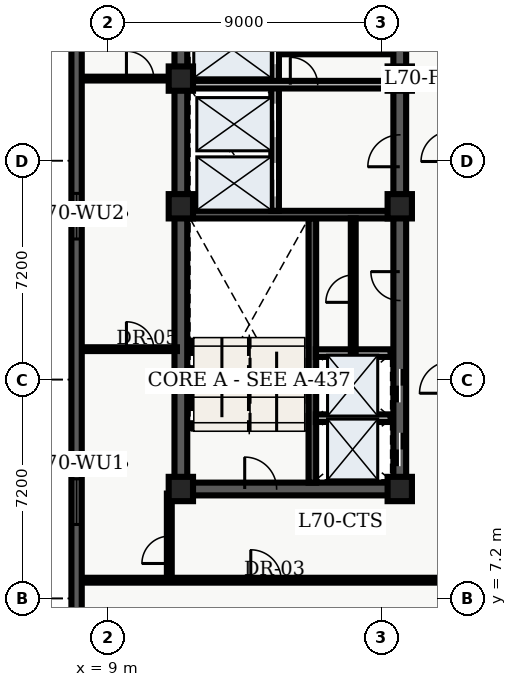
"""IFC4 building model, lengths in metres.
Left out: names, types, materials, properties, quantities, classifications, styles, units other than length and angle.
Written with IfcOpenShell. Run it as: python <this file> out.ifc"""

import sys

from ifc_helpers import new_model, entity, si_unit, converted_unit, direction, frame, origin_with_axes, origin_2d_with_axis, place, context, subcontext, project, spatial, polyline, rectangle, outline, extrude, element, fill, save


model = new_model("IFC4")
c1 = context("Model", 3, precision=1e-05, world=origin_with_axes(), true_north=direction((0.0, 1.0)))
c2 = subcontext(c1, "Body", "Model", "MODEL_VIEW")
j1 = project(units=[si_unit("LENGTHUNIT", "METRE"), converted_unit("PLANEANGLEUNIT", "DEGREE", entity("IfcPlaneAngleMeasure", 0.017), si_unit("PLANEANGLEUNIT", "RADIAN"), dimensions=[0, 0, 0, 0, 0, 0, 0])], contexts=[c1])
p1 = place(None, origin_with_axes())
s1 = spatial("IfcSite", under=j1, at=p1, CompositionType="ELEMENT")
p2 = place(p1, origin_with_axes())
s2 = spatial("IfcBuilding", under=s1, at=p2, CompositionType="ELEMENT")
p3 = place(p2, frame((0.0, 0.0, 284.1), z_axis=(0.0, 0.0, 1.0), x_axis=(1.0, 0.0, 0.0)))
s3 = spatial("IfcBuildingStorey", under=s2, at=p3, CompositionType="ELEMENT", Elevation=284.1)
p4 = place(p3, frame((11.4, 10.8, 0.0), z_axis=(0.0, 0.0, 1.0), x_axis=(0.0, 1.0, 0.0)))
e1 = element("IfcWall", 1, at=p4, inside=s3, PredefinedType="SHEAR", context=c2, shape_type="SweptSolid", body=[
    extrude(outline(polyline([(0.0, -0.21), (27.0, -0.21), (27.0, 0.21), (0.0, 0.21), (0.0, -0.21)])), origin_with_axes(), (0.0, 0.0, 1.0), 3.6),
])
p5 = place(p3, frame((11.4, 10.8, 0.0), z_axis=(0.0, 0.0, 1.0), x_axis=(1.0, 0.0, 0.0)))
e2 = element("IfcWall", 2, at=p5, inside=s3, PredefinedType="SHEAR", context=c2, shape_type="SweptSolid", body=[
    extrude(outline(polyline([(0.0, -0.21), (7.2, -0.21), (7.2, 0.21), (0.0, 0.21), (0.0, -0.21)])), origin_with_axes(), (0.0, 0.0, 1.0), 3.6),
])
p6 = place(p5, frame((2.625, 0.0, 0.0), z_axis=(0.0, 0.0, 1.0), x_axis=(1.0, 0.0, 0.0)))
e3 = element("IfcOpeningElement", 3, at=p6, cuts=e2, PredefinedType="OPENING", context=c2, shape_type="SweptSolid", body=[
    extrude(rectangle(XDim=1.05, YDim=0.44, at=origin_2d_with_axis()), origin_with_axes(), (0.0, 0.0, 1.0), 2.15),
])
p7 = place(p3, frame((18.6, 10.8, 0.0), z_axis=(0.0, 0.0, 1.0), x_axis=(0.0, 1.0, 0.0)))
e4 = element("IfcWall", 4, at=p7, inside=s3, PredefinedType="SHEAR", context=c2, shape_type="SweptSolid", body=[
    extrude(outline(polyline([(0.0, -0.21), (13.5, -0.21), (13.5, 0.21), (0.0, 0.21), (0.0, -0.21)])), origin_with_axes(), (0.0, 0.0, 1.0), 3.6),
])
p8 = place(p7, frame((1.3, 0.0, 0.0), z_axis=(0.0, 0.0, 1.0), x_axis=(1.0, 0.0, 0.0)))
e5 = element("IfcOpeningElement", 5, at=p8, cuts=e4, PredefinedType="OPENING", context=c2, shape_type="SweptSolid", body=[
    extrude(rectangle(XDim=1.1, YDim=0.44, at=origin_2d_with_axis()), origin_with_axes(), (0.0, 0.0, 1.0), 2.15),
])
p9 = place(p7, frame((3.4, 0.0, 0.0), z_axis=(0.0, 0.0, 1.0), x_axis=(1.0, 0.0, 0.0)))
e6 = element("IfcOpeningElement", 6, at=p9, cuts=e4, PredefinedType="OPENING", context=c2, shape_type="SweptSolid", body=[
    extrude(rectangle(XDim=1.1, YDim=0.44, at=origin_2d_with_axis()), origin_with_axes(), (0.0, 0.0, 1.0), 2.15),
])
p10 = place(p7, frame((11.125, 0.0, 0.0), z_axis=(0.0, 0.0, 1.0), x_axis=(1.0, 0.0, 0.0)))
e7 = element("IfcOpeningElement", 7, at=p10, cuts=e4, PredefinedType="OPENING", context=c2, shape_type="SweptSolid", body=[
    extrude(rectangle(XDim=1.05, YDim=0.44, at=origin_2d_with_axis()), origin_with_axes(), (0.0, 0.0, 1.0), 2.15),
])
p11 = place(p7, frame((6.675, 0.0, 0.0), z_axis=(0.0, 0.0, 1.0), x_axis=(1.0, 0.0, 0.0)))
e8 = element("IfcOpeningElement", 8, at=p11, cuts=e4, PredefinedType="OPENING", context=c2, shape_type="SweptSolid", body=[
    extrude(rectangle(XDim=0.95, YDim=0.44, at=origin_2d_with_axis()), origin_with_axes(), (0.0, 0.0, 1.0), 2.15),
])
p12 = place(p3, frame((18.6, 24.3, 0.0), z_axis=(0.0, 0.0, 1.0), x_axis=(0.0, 1.0, 0.0)))
e9 = element("IfcWall", 9, at=p12, inside=s3, PredefinedType="SHEAR", context=c2, shape_type="SweptSolid", body=[
    extrude(outline(polyline([(0.0, -0.21), (13.5, -0.21), (13.5, 0.21), (0.0, 0.21), (0.0, -0.21)])), origin_with_axes(), (0.0, 0.0, 1.0), 3.6),
])
p13 = place(p12, frame((6.725, 0.0, 0.0), z_axis=(0.0, 0.0, 1.0), x_axis=(1.0, 0.0, 0.0)))
e10 = element("IfcOpeningElement", 10, at=p13, cuts=e9, PredefinedType="OPENING", context=c2, shape_type="SweptSolid", body=[
    extrude(rectangle(XDim=1.05, YDim=0.44, at=origin_2d_with_axis()), origin_with_axes(), (0.0, 0.0, 1.0), 2.15),
])
p14 = place(p12, frame((11.125, 0.0, 0.0), z_axis=(0.0, 0.0, 1.0), x_axis=(1.0, 0.0, 0.0)))
e11 = element("IfcOpeningElement", 11, at=p14, cuts=e9, PredefinedType="OPENING", context=c2, shape_type="SweptSolid", body=[
    extrude(rectangle(XDim=1.05, YDim=0.44, at=origin_2d_with_axis()), origin_with_axes(), (0.0, 0.0, 1.0), 2.15),
])
p15 = place(p3, frame((15.725, 11.01, 0.0), z_axis=(0.0, 0.0, 1.0), x_axis=(0.0, 1.0, 0.0)))
e12 = element("IfcWall", 12, at=p15, inside=s3, PredefinedType="SHEAR", context=c2, shape_type="SweptSolid", body=[
    extrude(outline(polyline([(0.0, -0.125), (8.69, -0.125), (8.69, 0.125), (0.0, 0.125), (0.0, -0.125)])), origin_with_axes(), (0.0, 0.0, 1.0), 3.6),
])
p16 = place(p3, frame((11.61, 19.825, 0.0), z_axis=(0.0, 0.0, 1.0), x_axis=(1.0, 0.0, 0.0)))
e13 = element("IfcWall", 13, at=p16, inside=s3, PredefinedType="SHEAR", context=c2, shape_type="SweptSolid", body=[
    extrude(outline(polyline([(0.0, -0.125), (6.78, -0.125), (6.78, 0.125), (0.0, 0.125), (0.0, -0.125)])), origin_with_axes(), (0.0, 0.0, 1.0), 3.6),
])
p17 = place(p3, frame((14.5, 19.95, 0.0), z_axis=(0.0, 0.0, 1.0), x_axis=(0.0, 1.0, 0.0)))
e14 = element("IfcWall", 14, at=p17, inside=s3, PredefinedType="SOLIDWALL", context=c2, shape_type="SweptSolid", body=[
    extrude(outline(polyline([(0.0, -0.125), (6.25, -0.125), (6.25, 0.125), (0.0, 0.125), (0.0, -0.125)])), origin_with_axes(), (0.0, 0.0, 1.0), 2.64),
])
p18 = place(p17, frame((1.025, 0.0, 0.0), z_axis=(0.0, 0.0, 1.0), x_axis=(1.0, 0.0, 0.0)))
e15 = element("IfcOpeningElement", 15, at=p18, cuts=e14, PredefinedType="OPENING", context=c2, shape_type="SweptSolid", body=[
    extrude(rectangle(XDim=1.1, YDim=0.27, at=origin_2d_with_axis()), origin_with_axes(), (0.0, 0.0, 1.0), 2.15),
])
p19 = place(p17, frame((2.975, 0.0, 0.0), z_axis=(0.0, 0.0, 1.0), x_axis=(1.0, 0.0, 0.0)))
e16 = element("IfcOpeningElement", 16, at=p19, cuts=e14, PredefinedType="OPENING", context=c2, shape_type="SweptSolid", body=[
    extrude(rectangle(XDim=1.1, YDim=0.27, at=origin_2d_with_axis()), origin_with_axes(), (0.0, 0.0, 1.0), 2.15),
])
p20 = place(p17, frame((5.425, 0.0, 0.0), z_axis=(0.0, 0.0, 1.0), x_axis=(1.0, 0.0, 0.0)))
e17 = element("IfcOpeningElement", 17, at=p20, cuts=e14, PredefinedType="OPENING", context=c2, shape_type="SweptSolid", body=[
    extrude(rectangle(XDim=1.2, YDim=0.27, at=origin_2d_with_axis()), origin_with_axes(), (0.0, 0.0, 1.0), 2.15),
])
p21 = place(p3, frame((11.7, 24.1, 0.0), z_axis=(0.0, 0.0, 1.0), x_axis=(1.0, 0.0, 0.0)))
e18 = element("IfcWall", 18, at=p21, inside=s3, PredefinedType="SOLIDWALL", context=c2, shape_type="SweptSolid", body=[
    extrude(outline(polyline([(0.0, -0.125), (6.6, -0.125), (6.6, 0.125), (0.0, 0.125), (0.0, -0.125)])), origin_with_axes(), (0.0, 0.0, 1.0), 2.64),
])
p22 = place(p21, frame((3.75, 0.0, 0.0), z_axis=(0.0, 0.0, 1.0), x_axis=(1.0, 0.0, 0.0)))
e19 = element("IfcOpeningElement", 19, at=p22, cuts=e18, PredefinedType="OPENING", context=c2, shape_type="SweptSolid", body=[
    extrude(rectangle(XDim=0.9, YDim=0.27, at=origin_2d_with_axis()), origin_with_axes(), (0.0, 0.0, 1.0), 2.15),
])
for number, where, z_axis, x_axis in (
    (20, (11.4, 10.8, 0.0), (0.0, 0.0, 1.0), (1.0, 0.0, 0.0)),
    (21, (11.4, 20.1, 0.0), (0.0, 0.0, 1.0), (1.0, 0.0, 0.0)),
    (22, (11.4, 24.3, 0.0), (0.0, 0.0, 1.0), (1.0, 0.0, 0.0)),
    (23, (18.6, 10.8, 0.0), (0.0, 0.0, 1.0), (1.0, 0.0, 0.0)),
    (24, (18.6, 20.1, 0.0), (0.0, 0.0, 1.0), (1.0, 0.0, 0.0)),
    (25, (18.6, 24.3, 0.0), (0.0, 0.0, 1.0), (1.0, 0.0, 0.0)),
):
    element("IfcColumn", number, at=place(p3, frame(where, z_axis=z_axis, x_axis=x_axis)), inside=s3, PredefinedType="COLUMN", context=c2, shape_type="SweptSolid", body=[
        extrude(rectangle(XDim=0.8, YDim=0.8, at=origin_2d_with_axis()), origin_with_axes(), (0.0, 0.0, 1.0), 3.9),
    ])
p23 = place(p3, frame((14.62, 25.18, 0.0), z_axis=(0.0, 0.0, 1.0), x_axis=(1.0, 0.0, 0.0)))
e26 = element("IfcWall", 26, at=p23, inside=s3, PredefinedType="PARTITIONING", context=c2, shape_type="SweptSolid", body=[
    extrude(outline(polyline([(0.0, -0.08), (3.68, -0.08), (3.68, 0.08), (0.0, 0.08), (0.0, -0.08)])), origin_with_axes(), (0.0, 0.0, 1.0), 2.64),
])
p24 = place(p23, frame((1.95, 0.0, 0.0), z_axis=(0.0, 0.0, 1.0), x_axis=(1.0, 0.0, 0.0)))
e27 = element("IfcOpeningElement", 27, at=p24, cuts=e26, PredefinedType="OPENING", context=c2, shape_type="SweptSolid", body=[
    extrude(rectangle(XDim=0.9, YDim=0.18, at=origin_2d_with_axis()), origin_with_axes(), (0.0, 0.0, 1.0), 2.15),
])
for number, where, z_axis, x_axis in (
    (28, (15.84, 13.13, 0.0), (0.0, 0.0, 1.0), (1.0, 0.0, 0.0)),
    (29, (15.84, 15.27, 0.0), (0.0, 0.0, 1.0), (1.0, 0.0, 0.0)),
):
    element("IfcWall", number, at=place(p3, frame(where, z_axis=z_axis, x_axis=x_axis)), inside=s3, PredefinedType="SOLIDWALL", context=c2, shape_type="SweptSolid", body=[
        extrude(outline(polyline([(0.0, -0.125), (2.46, -0.125), (2.46, 0.125), (0.0, 0.125), (0.0, -0.125)])), origin_with_axes(), (0.0, 0.0, 1.0), 2.64),
    ])
p25 = place(p3, frame((17.07, 15.34, 0.0), z_axis=(0.0, 0.0, 1.0), x_axis=(0.0, 1.0, 0.0)))
e30 = element("IfcWall", 30, at=p25, inside=s3, PredefinedType="PARTITIONING", context=c2, shape_type="SweptSolid", body=[
    extrude(outline(polyline([(0.0, -0.08), (4.36, -0.08), (4.36, 0.08), (0.0, 0.08), (0.0, -0.08)])), origin_with_axes(), (0.0, 0.0, 1.0), 2.64),
])
p26 = place(p25, frame((2.05, 0.0, 0.0), z_axis=(0.0, 0.0, 1.0), x_axis=(1.0, 0.0, 0.0)))
e31 = element("IfcOpeningElement", 31, at=p26, cuts=e30, PredefinedType="OPENING", context=c2, shape_type="SweptSolid", body=[
    extrude(rectangle(XDim=0.9, YDim=0.18, at=origin_2d_with_axis()), origin_with_axes(), (0.0, 0.0, 1.0), 2.15),
])
p27 = place(p3, frame((8.135, 7.8, 0.0), z_axis=(0.0, 0.0, 1.0), x_axis=(1.0, 0.0, 0.0)))
e32 = element("IfcWall", 32, at=p27, inside=s3, PredefinedType="PARTITIONING", context=c2, shape_type="SweptSolid", body=[
    extrude(outline(polyline([(0.0, -0.08), (12.165, -0.08), (12.165, 0.08), (0.0, 0.08), (0.0, -0.08)])), origin_with_axes(), (0.0, 0.0, 1.0), 2.64),
])
p28 = place(p27, frame((6.065, 0.0, 0.0), z_axis=(0.0, 0.0, 1.0), x_axis=(1.0, 0.0, 0.0)))
e33 = element("IfcOpeningElement", 33, at=p28, cuts=e32, PredefinedType="OPENING", context=c2, shape_type="SweptSolid", body=[
    extrude(rectangle(XDim=1.0, YDim=0.18, at=origin_2d_with_axis()), origin_with_axes(), (0.0, 0.0, 1.0), 2.15),
])
p29 = place(p3, frame((11.02, 7.8, 0.0), z_axis=(0.0, 0.0, 1.0), x_axis=(0.0, 1.0, 0.0)))
e34 = element("IfcWall", 34, at=p29, inside=s3, PredefinedType="PARTITIONING", context=c2, shape_type="SweptSolid", body=[
    extrude(outline(polyline([(0.0, -0.08), (2.85, -0.08), (2.85, 0.08), (0.0, 0.08), (0.0, -0.08)])), origin_with_axes(), (0.0, 0.0, 1.0), 2.64),
])
p30 = place(p29, frame((1.0, 0.0, 0.0), z_axis=(0.0, 0.0, 1.0), x_axis=(1.0, 0.0, 0.0)))
e35 = element("IfcOpeningElement", 35, at=p30, cuts=e34, PredefinedType="OPENING", context=c2, shape_type="SweptSolid", body=[
    extrude(rectangle(XDim=0.9, YDim=0.18, at=origin_2d_with_axis()), origin_with_axes(), (0.0, 0.0, 1.0), 2.15),
])
p31 = place(p3, frame((8.135, 15.4, 0.0), z_axis=(0.0, 0.0, 1.0), x_axis=(1.0, 0.0, 0.0)))
e36 = element("IfcWall", 36, at=p31, inside=s3, PredefinedType="PARTITIONING", context=c2, shape_type="SweptSolid", body=[
    extrude(outline(polyline([(0.0, -0.062), (3.135, -0.062), (3.135, 0.062), (0.0, 0.062), (0.0, -0.062)])), origin_with_axes(), (0.0, 0.0, 1.0), 2.64),
])
p32 = place(p31, frame((1.925, 0.0, 0.0), z_axis=(0.0, 0.0, 1.0), x_axis=(1.0, 0.0, 0.0)))
e37 = element("IfcOpeningElement", 37, at=p32, cuts=e36, PredefinedType="OPENING", context=c2, shape_type="SweptSolid", body=[
    extrude(rectangle(XDim=0.9, YDim=0.145, at=origin_2d_with_axis()), origin_with_axes(), (0.0, 0.0, 1.0), 2.15),
])
p33 = place(p3, frame((8.135, 24.3, 0.0), z_axis=(0.0, 0.0, 1.0), x_axis=(1.0, 0.0, 0.0)))
e38 = element("IfcWall", 38, at=p33, inside=s3, PredefinedType="PARTITIONING", context=c2, shape_type="SweptSolid", body=[
    extrude(outline(polyline([(0.0, -0.062), (3.135, -0.062), (3.135, 0.062), (0.0, 0.062), (0.0, -0.062)])), origin_with_axes(), (0.0, 0.0, 1.0), 2.64),
])
p34 = place(p33, frame((1.925, 0.0, 0.0), z_axis=(0.0, 0.0, 1.0), x_axis=(1.0, 0.0, 0.0)))
e39 = element("IfcOpeningElement", 39, at=p34, cuts=e38, PredefinedType="OPENING", context=c2, shape_type="SweptSolid", body=[
    extrude(rectangle(XDim=0.9, YDim=0.145, at=origin_2d_with_axis()), origin_with_axes(), (0.0, 0.0, 1.0), 2.15),
])
p35 = place(p3, frame((7.97, 2.74, 0.0), z_axis=(0.0, 0.0, 1.0), x_axis=(0.0, 1.0, 0.0)))
e40 = element("IfcWall", 40, at=p35, inside=s3, PredefinedType="SOLIDWALL", context=c2, shape_type="SweptSolid", body=[
    extrude(outline(polyline([(0.0, -0.17), (43.46, -0.17), (43.46, 0.17), (0.0, 0.17), (0.0, -0.17)])), origin_with_axes(), (0.0, 0.0, 1.0), 3.6),
])
p36 = place(p35, frame((2.948, 0.0, 0.45), z_axis=(0.0, 0.0, 1.0), x_axis=(1.0, 0.0, 0.0)))
e41 = element("IfcOpeningElement", 41, at=p36, cuts=e40, PredefinedType="OPENING", context=c2, shape_type="SweptSolid", body=[
    extrude(rectangle(XDim=1.5, YDim=0.36, at=origin_2d_with_axis()), origin_with_axes(), (0.0, 0.0, 1.0), 2.1),
])
p37 = place(p35, frame((7.643, 0.0, 0.45), z_axis=(0.0, 0.0, 1.0), x_axis=(1.0, 0.0, 0.0)))
e42 = element("IfcOpeningElement", 42, at=p37, cuts=e40, PredefinedType="OPENING", context=c2, shape_type="SweptSolid", body=[
    extrude(rectangle(XDim=1.5, YDim=0.36, at=origin_2d_with_axis()), origin_with_axes(), (0.0, 0.0, 1.0), 2.1),
])
p38 = place(p35, frame((17.034, 0.0, 0.45), z_axis=(0.0, 0.0, 1.0), x_axis=(1.0, 0.0, 0.0)))
e43 = element("IfcOpeningElement", 43, at=p38, cuts=e40, PredefinedType="OPENING", context=c2, shape_type="SweptSolid", body=[
    extrude(rectangle(XDim=1.5, YDim=0.36, at=origin_2d_with_axis()), origin_with_axes(), (0.0, 0.0, 1.0), 2.1),
])
p39 = place(p35, frame((26.426, 0.0, 0.45), z_axis=(0.0, 0.0, 1.0), x_axis=(1.0, 0.0, 0.0)))
e44 = element("IfcOpeningElement", 44, at=p39, cuts=e40, PredefinedType="OPENING", context=c2, shape_type="SweptSolid", body=[
    extrude(rectangle(XDim=1.5, YDim=0.36, at=origin_2d_with_axis()), origin_with_axes(), (0.0, 0.0, 1.0), 2.1),
])
p40 = place(p35, frame((31.571, 0.0, 0.45), z_axis=(0.0, 0.0, 1.0), x_axis=(1.0, 0.0, 0.0)))
e45 = element("IfcOpeningElement", 45, at=p40, cuts=e40, PredefinedType="OPENING", context=c2, shape_type="SweptSolid", body=[
    extrude(rectangle(XDim=1.5, YDim=0.36, at=origin_2d_with_axis()), origin_with_axes(), (0.0, 0.0, 1.0), 2.1),
])
p41 = place(p35, frame((35.817, 0.0, 0.45), z_axis=(0.0, 0.0, 1.0), x_axis=(1.0, 0.0, 0.0)))
e46 = element("IfcOpeningElement", 46, at=p41, cuts=e40, PredefinedType="OPENING", context=c2, shape_type="SweptSolid", body=[
    extrude(rectangle(XDim=1.5, YDim=0.36, at=origin_2d_with_axis()), origin_with_axes(), (0.0, 0.0, 1.0), 2.1),
])
p42 = place(p35, frame((40.512, 0.0, 0.45), z_axis=(0.0, 0.0, 1.0), x_axis=(1.0, 0.0, 0.0)))
e47 = element("IfcOpeningElement", 47, at=p42, cuts=e40, PredefinedType="OPENING", context=c2, shape_type="SweptSolid", body=[
    extrude(rectangle(XDim=1.5, YDim=0.36, at=origin_2d_with_axis()), origin_with_axes(), (0.0, 0.0, 1.0), 2.1),
])
p43 = place(p7, frame((1.3, 0.0, 0.0), z_axis=(0.0, 0.0, 1.0), x_axis=(1.0, 0.0, 0.0)))
e48 = element("IfcDoor", 48, at=p43, inside=s3, OperationType="SLIDING_TO_LEFT", PredefinedType="DOOR", context=c2, shape_type="SweptSolid", body=[
    extrude(rectangle(XDim=1.1, YDim=0.09, at=origin_2d_with_axis()), origin_with_axes(), (0.0, 0.0, 1.0), 2.15),
])
fill(e5, e48)
p44 = place(p7, frame((3.4, 0.0, 0.0), z_axis=(0.0, 0.0, 1.0), x_axis=(1.0, 0.0, 0.0)))
e49 = element("IfcDoor", 49, at=p44, inside=s3, OperationType="SLIDING_TO_RIGHT", PredefinedType="DOOR", context=c2, shape_type="SweptSolid", body=[
    extrude(rectangle(XDim=1.1, YDim=0.09, at=origin_2d_with_axis()), origin_with_axes(), (0.0, 0.0, 1.0), 2.15),
])
fill(e6, e49)
p45 = place(p17, frame((1.025, 0.0, 0.0), z_axis=(0.0, 0.0, 1.0), x_axis=(1.0, 0.0, 0.0)))
e50 = element("IfcDoor", 50, at=p45, inside=s3, OperationType="SLIDING_TO_LEFT", PredefinedType="DOOR", context=c2, shape_type="SweptSolid", body=[
    extrude(rectangle(XDim=1.1, YDim=0.09, at=origin_2d_with_axis()), origin_with_axes(), (0.0, 0.0, 1.0), 2.15),
])
fill(e15, e50)
p46 = place(p17, frame((2.975, 0.0, 0.0), z_axis=(0.0, 0.0, 1.0), x_axis=(1.0, 0.0, 0.0)))
e51 = element("IfcDoor", 51, at=p46, inside=s3, OperationType="SLIDING_TO_RIGHT", PredefinedType="DOOR", context=c2, shape_type="SweptSolid", body=[
    extrude(rectangle(XDim=1.1, YDim=0.09, at=origin_2d_with_axis()), origin_with_axes(), (0.0, 0.0, 1.0), 2.15),
])
fill(e16, e51)
p47 = place(p17, frame((5.425, 0.0, 0.0), z_axis=(0.0, 0.0, 1.0), x_axis=(1.0, 0.0, 0.0)))
e52 = element("IfcDoor", 52, at=p47, inside=s3, OperationType="DOUBLE_DOOR_SLIDING", PredefinedType="DOOR", context=c2, shape_type="SweptSolid", body=[
    extrude(rectangle(XDim=1.2, YDim=0.09, at=origin_2d_with_axis()), origin_with_axes(), (0.0, 0.0, 1.0), 2.15),
])
fill(e17, e52)
p48 = place(p5, frame((2.625, 0.0, 0.0), z_axis=(0.0, 0.0, 1.0), x_axis=(1.0, 0.0, 0.0)))
e53 = element("IfcDoor", 53, at=p48, inside=s3, OperationType="SINGLE_SWING_LEFT", PredefinedType="DOOR", context=c2, shape_type="SweptSolid", body=[
    extrude(rectangle(XDim=1.05, YDim=0.09, at=origin_2d_with_axis()), origin_with_axes(), (0.0, 0.0, 1.0), 2.15),
])
fill(e3, e53)
p49 = place(p7, frame((11.125, 0.0, 0.0), z_axis=(0.0, 0.0, 1.0), x_axis=(1.0, 0.0, 0.0)))
e54 = element("IfcDoor", 54, at=p49, inside=s3, OperationType="SINGLE_SWING_LEFT", PredefinedType="DOOR", context=c2, shape_type="SweptSolid", body=[
    extrude(rectangle(XDim=1.05, YDim=0.09, at=origin_2d_with_axis()), origin_with_axes(), (0.0, 0.0, 1.0), 2.15),
])
fill(e7, e54)
p50 = place(p21, frame((3.75, 0.0, 0.0), z_axis=(0.0, 0.0, 1.0), x_axis=(1.0, 0.0, 0.0)))
e55 = element("IfcDoor", 55, at=p50, inside=s3, OperationType="SINGLE_SWING_LEFT", PredefinedType="DOOR", context=c2, shape_type="SweptSolid", body=[
    extrude(rectangle(XDim=0.9, YDim=0.09, at=origin_2d_with_axis()), origin_with_axes(), (0.0, 0.0, 1.0), 2.15),
])
fill(e19, e55)
p51 = place(p23, frame((1.95, 0.0, 0.0), z_axis=(0.0, 0.0, 1.0), x_axis=(1.0, 0.0, 0.0)))
e56 = element("IfcDoor", 56, at=p51, inside=s3, OperationType="SINGLE_SWING_LEFT", PredefinedType="DOOR", context=c2, shape_type="SweptSolid", body=[
    extrude(rectangle(XDim=0.9, YDim=0.09, at=origin_2d_with_axis()), origin_with_axes(), (0.0, 0.0, 1.0), 2.15),
])
fill(e27, e56)
p52 = place(p25, frame((2.05, 0.0, 0.0), z_axis=(0.0, 0.0, 1.0), x_axis=(1.0, 0.0, 0.0)))
e57 = element("IfcDoor", 57, at=p52, inside=s3, OperationType="SINGLE_SWING_LEFT", PredefinedType="DOOR", context=c2, shape_type="SweptSolid", body=[
    extrude(rectangle(XDim=0.9, YDim=0.09, at=origin_2d_with_axis()), origin_with_axes(), (0.0, 0.0, 1.0), 2.15),
])
fill(e31, e57)
p53 = place(p7, frame((6.675, 0.0, 0.0), z_axis=(0.0, 0.0, 1.0), x_axis=(1.0, 0.0, 0.0)))
e58 = element("IfcDoor", 58, at=p53, inside=s3, OperationType="SINGLE_SWING_RIGHT", PredefinedType="DOOR", context=c2, shape_type="SweptSolid", body=[
    extrude(rectangle(XDim=0.95, YDim=0.09, at=origin_2d_with_axis()), origin_with_axes(), (0.0, 0.0, 1.0), 2.15),
])
fill(e8, e58)
p54 = place(p31, frame((1.925, 0.0, 0.0), z_axis=(0.0, 0.0, 1.0), x_axis=(1.0, 0.0, 0.0)))
e59 = element("IfcDoor", 59, at=p54, inside=s3, OperationType="SINGLE_SWING_LEFT", PredefinedType="DOOR", context=c2, shape_type="SweptSolid", body=[
    extrude(rectangle(XDim=0.9, YDim=0.075, at=origin_2d_with_axis()), origin_with_axes(), (0.0, 0.0, 1.0), 2.15),
])
fill(e37, e59)
p55 = place(p33, frame((1.925, 0.0, 0.0), z_axis=(0.0, 0.0, 1.0), x_axis=(1.0, 0.0, 0.0)))
e60 = element("IfcDoor", 60, at=p55, inside=s3, OperationType="SINGLE_SWING_LEFT", PredefinedType="DOOR", context=c2, shape_type="SweptSolid", body=[
    extrude(rectangle(XDim=0.9, YDim=0.075, at=origin_2d_with_axis()), origin_with_axes(), (0.0, 0.0, 1.0), 2.15),
])
fill(e39, e60)
p56 = place(p29, frame((1.0, 0.0, 0.0), z_axis=(0.0, 0.0, 1.0), x_axis=(1.0, 0.0, 0.0)))
e61 = element("IfcDoor", 61, at=p56, inside=s3, OperationType="SINGLE_SWING_LEFT", PredefinedType="DOOR", context=c2, shape_type="SweptSolid", body=[
    extrude(rectangle(XDim=0.9, YDim=0.09, at=origin_2d_with_axis()), origin_with_axes(), (0.0, 0.0, 1.0), 2.15),
])
fill(e35, e61)
p57 = place(p27, frame((6.065, 0.0, 0.0), z_axis=(0.0, 0.0, 1.0), x_axis=(1.0, 0.0, 0.0)))
e62 = element("IfcDoor", 62, at=p57, inside=s3, OperationType="SINGLE_SWING_LEFT", PredefinedType="DOOR", context=c2, shape_type="SweptSolid", body=[
    extrude(rectangle(XDim=1.0, YDim=0.09, at=origin_2d_with_axis()), origin_with_axes(), (0.0, 0.0, 1.0), 2.15),
])
fill(e33, e62)
p58 = place(p35, frame((7.643, 0.0, 0.45), z_axis=(0.0, 0.0, 1.0), x_axis=(1.0, 0.0, 0.0)))
e63 = element("IfcWindow", 63, at=p58, inside=s3, PredefinedType="WINDOW", context=c2, shape_type="SweptSolid", body=[
    extrude(rectangle(XDim=1.5, YDim=0.09, at=origin_2d_with_axis()), origin_with_axes(), (0.0, 0.0, 1.0), 2.1),
])
fill(e42, e63)
p59 = place(p35, frame((17.034, 0.0, 0.45), z_axis=(0.0, 0.0, 1.0), x_axis=(1.0, 0.0, 0.0)))
e64 = element("IfcWindow", 64, at=p59, inside=s3, PredefinedType="WINDOW", context=c2, shape_type="SweptSolid", body=[
    extrude(rectangle(XDim=1.5, YDim=0.09, at=origin_2d_with_axis()), origin_with_axes(), (0.0, 0.0, 1.0), 2.1),
])
fill(e43, e64)
save(model, sys.argv[1])
